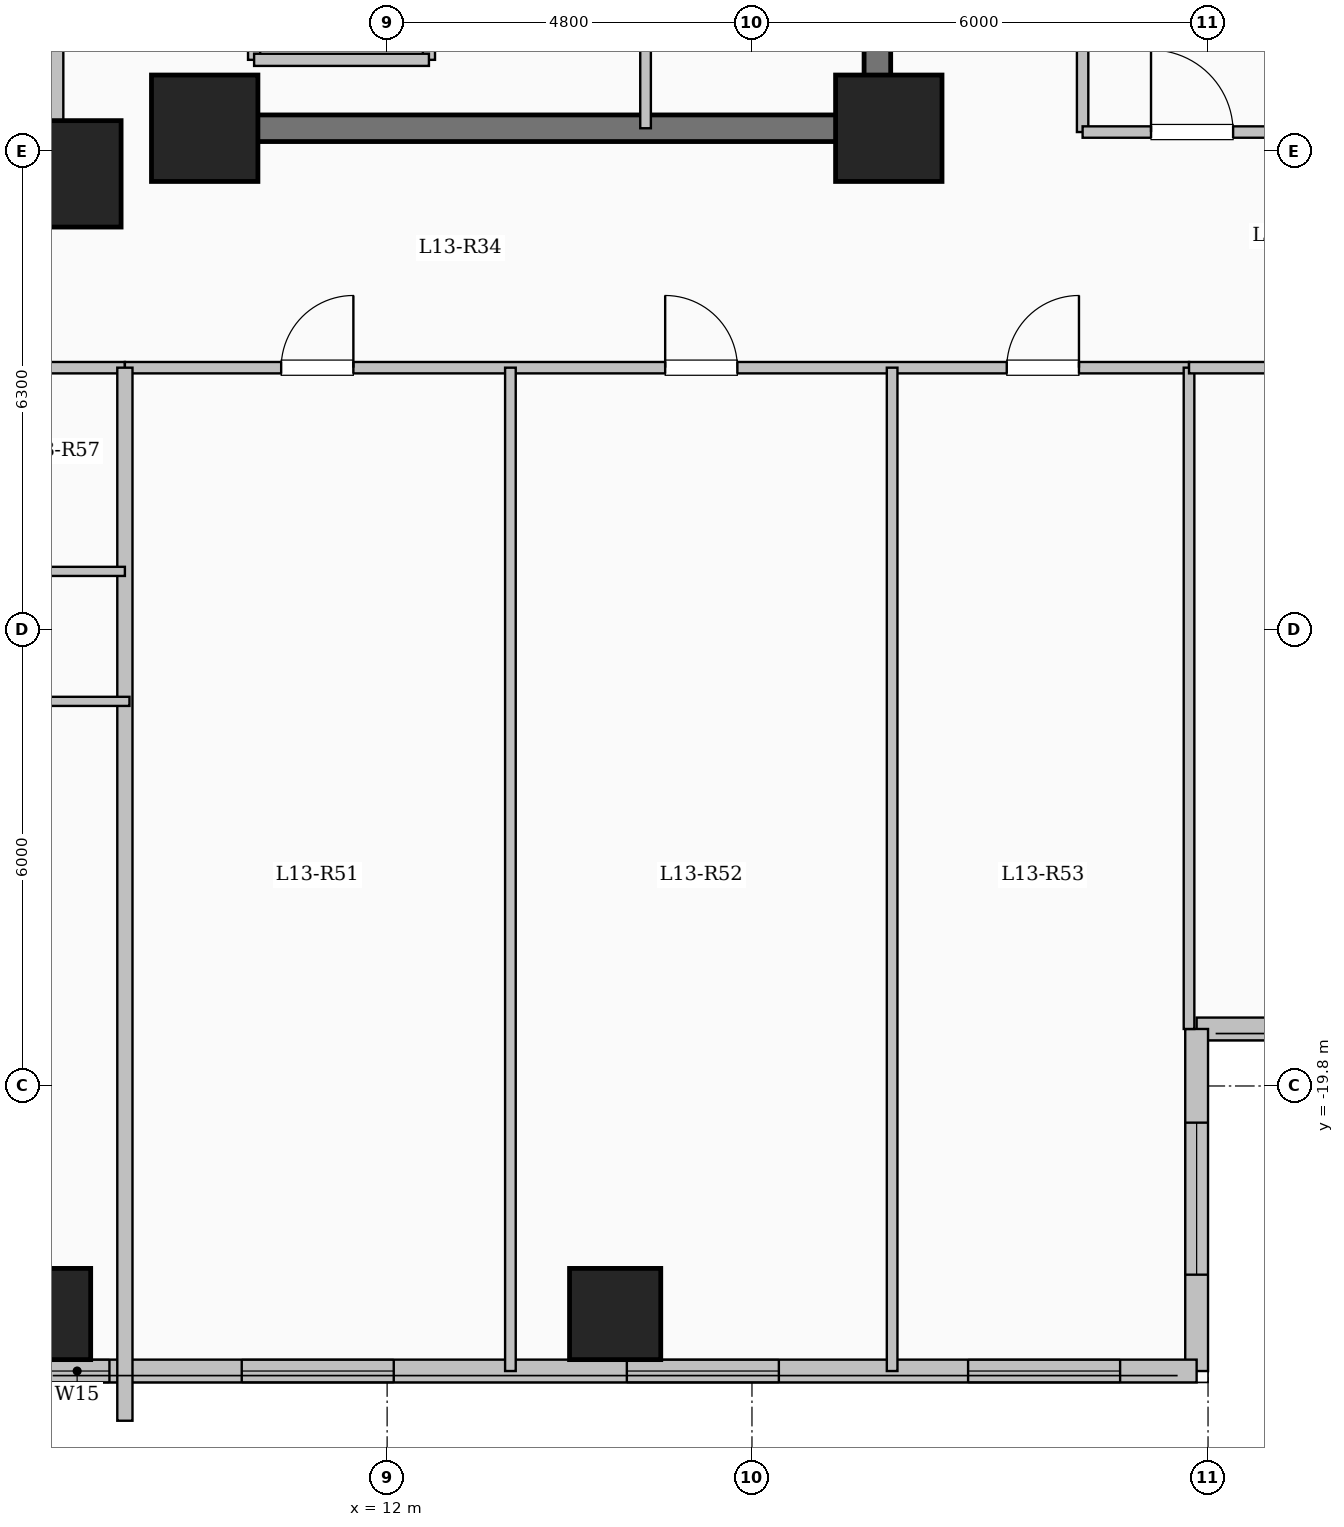
"""IFC4 building model, lengths in metres.
Left out: names, types, materials, properties, quantities, classifications, styles, units other than length and angle.
Written with IfcOpenShell. Run it as: python <this file> out.ifc"""

import sys

from ifc_helpers import new_model, si_unit, direction, frame, frame_2d, origin, origin_2d, place, context, subcontext, project, spatial, rectangle, extrude, element, fill, save


model = new_model("IFC4")
c1 = context("Model", 3, precision=1e-05, world=origin(), true_north=direction((0.0, 1.0)))
c2 = subcontext(c1, "Body", "Model", "MODEL_VIEW")
j1 = project(units=[si_unit("LENGTHUNIT", "METRE"), si_unit("PLANEANGLEUNIT", "RADIAN")], contexts=[c1])
p1 = place(None, origin())
s1 = spatial("IfcSite", under=j1, at=p1, CompositionType="ELEMENT")
p2 = place(p1, origin())
s2 = spatial("IfcBuilding", under=s1, at=p2, CompositionType="ELEMENT")
p3 = place(p2, frame((0.0, 0.0, 50.8)))
s3 = spatial("IfcBuildingStorey", under=s2, at=p3, CompositionType="ELEMENT", Elevation=50.8)
for number, where, z_axis, x_axis in (
    (1, (7.8, -7.8, 0.0), (0.0, 0.0, 1.0), (1.0, 0.0, 0.0)),
    (2, (9.6, -7.2, 0.0), (0.0, 0.0, 1.0), (1.0, 0.0, 0.0)),
    (3, (18.6, -7.2, 0.0), (0.0, 0.0, 1.0), (1.0, 0.0, 0.0)),
):
    element("IfcColumn", number, at=place(p3, frame(where, z_axis=z_axis, x_axis=x_axis)), inside=s3, PredefinedType="COLUMN", context=c2, shape_type="SweptSolid", body=[
        extrude(rectangle(XDim=1.4, YDim=1.4, at=origin_2d()), origin(), (0.0, 0.0, 1.0), 3.35),
    ])
for number, where, z_axis, x_axis in (
    (4, (7.5, -22.8, 0.0), (0.0, 0.0, 1.0), (1.0, 0.0, 0.0)),
    (5, (15.0, -22.8, 0.0), (0.0, 0.0, 1.0), (1.0, 0.0, 0.0)),
):
    element("IfcColumn", number, at=place(p3, frame(where, z_axis=z_axis, x_axis=x_axis)), inside=s3, PredefinedType="COLUMN", context=c2, shape_type="SweptSolid", body=[
        extrude(rectangle(XDim=1.2, YDim=1.2, at=origin_2d()), origin(), (0.0, 0.0, 1.0), 3.35),
    ])
p4 = place(p3, frame((-7.62, -7.62, 0.0), z_axis=(0.0, 0.0, 1.0), x_axis=(1.0, 0.0, 0.0)))
e6 = element("IfcWall", 6, at=p4, inside=s3, PredefinedType="SOLIDWALL", context=c2, shape_type="SweptSolid", body=[
    extrude(rectangle(XDim=15.24, YDim=0.24, at=frame_2d((7.62, 0.0))), origin(), (0.0, 0.0, 1.0), 3.1),
])
p5 = place(p4, frame((6.92, 0.0, 0.95)))
e7 = element("IfcOpeningElement", 7, at=p5, cuts=e6, PredefinedType="OPENING", context=c2, shape_type="SweptSolid", body=[
    extrude(rectangle(XDim=1.4, YDim=1.5, at=frame_2d((0.7, 0.75))), frame((0.0, 0.13, 0.0), z_axis=(0.0, -1.0, 0.0), x_axis=(1.0, 0.0, 0.0)), (0.0, 0.0, 1.0), 0.26),
])
p6 = place(p3, frame((7.62, -7.62, 0.0), z_axis=(0.0, 0.0, 1.0), x_axis=(0.0, 1.0, 0.0)))
e8 = element("IfcWall", 8, at=p6, inside=s3, PredefinedType="SOLIDWALL", context=c2, shape_type="SweptSolid", body=[
    extrude(rectangle(XDim=15.24, YDim=0.24, at=frame_2d((7.62, 0.0))), origin(), (0.0, 0.0, 1.0), 3.1),
])
p7 = place(p6, frame((6.92, 0.0, 0.95)))
e9 = element("IfcOpeningElement", 9, at=p7, cuts=e8, PredefinedType="OPENING", context=c2, shape_type="SweptSolid", body=[
    extrude(rectangle(XDim=1.4, YDim=1.5, at=frame_2d((0.7, 0.75))), frame((0.0, 0.13, 0.0), z_axis=(0.0, -1.0, 0.0), x_axis=(1.0, 0.0, 0.0)), (0.0, 0.0, 1.0), 0.26),
])
p8 = place(p3, frame((28.65, -19.05, 0.0), z_axis=(0.0, 0.0, 1.0), x_axis=(-1.0, 0.0, 0.0)))
e10 = element("IfcWall", 10, at=p8, inside=s3, PredefinedType="SOLIDWALL", context=c2, shape_type="SweptSolid", body=[
    extrude(rectangle(XDim=6.0, YDim=0.3, at=frame_2d((3.0, 0.0))), origin(), (0.0, 0.0, 1.0), 3.1),
])
p9 = place(p8, frame((1.825, 0.0, 0.9)))
e11 = element("IfcOpeningElement", 11, at=p9, cuts=e10, PredefinedType="OPENING", context=c2, shape_type="SweptSolid", body=[
    extrude(rectangle(XDim=2.4, YDim=1.8, at=frame_2d((1.2, 0.9))), frame((0.0, 0.16, 0.0), z_axis=(0.0, -1.0, 0.0), x_axis=(1.0, 0.0, 0.0)), (0.0, 0.0, 1.0), 0.32),
])
p10 = place(p3, frame((22.65, -19.05, 0.0), z_axis=(0.0, 0.0, 1.0), x_axis=(0.0, -1.0, 0.0)))
e12 = element("IfcWall", 12, at=p10, inside=s3, PredefinedType="SOLIDWALL", context=c2, shape_type="SweptSolid", body=[
    extrude(rectangle(XDim=4.5, YDim=0.3, at=frame_2d((2.25, 0.0))), origin(), (0.0, 0.0, 1.0), 3.1),
])
p11 = place(p10, frame((1.232, 0.0, 0.9)))
e13 = element("IfcOpeningElement", 13, at=p11, cuts=e12, PredefinedType="OPENING", context=c2, shape_type="SweptSolid", body=[
    extrude(rectangle(XDim=2.0, YDim=1.7, at=frame_2d((1.0, 0.85))), frame((0.0, 0.16, 0.0), z_axis=(0.0, -1.0, 0.0), x_axis=(1.0, 0.0, 0.0)), (0.0, 0.0, 1.0), 0.32),
])
p12 = place(p3, frame((22.65, -23.55, 0.0), z_axis=(0.0, 0.0, 1.0), x_axis=(-1.0, 0.0, 0.0)))
e14 = element("IfcWall", 14, at=p12, inside=s3, PredefinedType="SOLIDWALL", context=c2, shape_type="SweptSolid", body=[
    extrude(rectangle(XDim=15.3, YDim=0.3, at=frame_2d((7.65, 0.0))), origin(), (0.0, 0.0, 1.0), 3.1),
])
p13 = place(p12, frame((1.007, 0.0, 0.9)))
e15 = element("IfcOpeningElement", 15, at=p13, cuts=e14, PredefinedType="OPENING", context=c2, shape_type="SweptSolid", body=[
    extrude(rectangle(XDim=2.0, YDim=1.7, at=frame_2d((1.0, 0.85))), frame((0.0, 0.16, 0.0), z_axis=(0.0, -1.0, 0.0), x_axis=(1.0, 0.0, 0.0)), (0.0, 0.0, 1.0), 0.32),
])
p14 = place(p12, frame((5.496, 0.0, 0.9)))
e16 = element("IfcOpeningElement", 16, at=p14, cuts=e14, PredefinedType="OPENING", context=c2, shape_type="SweptSolid", body=[
    extrude(rectangle(XDim=2.0, YDim=1.7, at=frame_2d((1.0, 0.85))), frame((0.0, 0.16, 0.0), z_axis=(0.0, -1.0, 0.0), x_axis=(1.0, 0.0, 0.0)), (0.0, 0.0, 1.0), 0.32),
])
p15 = place(p12, frame((10.563, 0.0, 0.9)))
e17 = element("IfcOpeningElement", 17, at=p15, cuts=e14, PredefinedType="OPENING", context=c2, shape_type="SweptSolid", body=[
    extrude(rectangle(XDim=2.0, YDim=1.7, at=frame_2d((1.0, 0.85))), frame((0.0, 0.16, 0.0), z_axis=(0.0, -1.0, 0.0), x_axis=(1.0, 0.0, 0.0)), (0.0, 0.0, 1.0), 0.32),
])
p16 = place(p12, frame((14.303, 0.0, 0.95)))
e18 = element("IfcOpeningElement", 18, at=p16, cuts=e14, PredefinedType="OPENING", context=c2, shape_type="SweptSolid", body=[
    extrude(rectangle(XDim=0.85, YDim=1.5, at=frame_2d((0.425, 0.75))), frame((0.0, 0.16, 0.0), z_axis=(0.0, -1.0, 0.0), x_axis=(1.0, 0.0, 0.0)), (0.0, 0.0, 1.0), 0.32),
])
for number, where, z_axis, x_axis in (
    (19, (10.25, -6.3, 0.0), (0.0, 0.0, 1.0), (0.0, 1.0, 0.0)),
    (20, (12.55, -6.3, 0.0), (0.0, 0.0, 1.0), (0.0, 1.0, 0.0)),
):
    element("IfcWall", number, at=place(p3, frame(where, z_axis=z_axis, x_axis=x_axis)), inside=s3, PredefinedType="SOLIDWALL", context=c2, shape_type="SweptSolid", body=[
        extrude(rectangle(XDim=2.6, YDim=0.16, at=frame_2d((1.3, 0.0))), origin(), (0.0, 0.0, 1.0), 3.1),
    ])
p17 = place(p3, frame((10.25, -6.3, 0.0), z_axis=(0.0, 0.0, 1.0), x_axis=(1.0, 0.0, 0.0)))
e21 = element("IfcWall", 21, at=p17, inside=s3, PredefinedType="SOLIDWALL", context=c2, shape_type="SweptSolid", body=[
    extrude(rectangle(XDim=2.3, YDim=0.16, at=frame_2d((1.15, 0.0))), origin(), (0.0, 0.0, 1.0), 3.1),
])
p18 = place(p3, frame((18.45, -7.375, 0.0), z_axis=(0.0, 0.0, 1.0), x_axis=(0.0, 1.0, 0.0)))
e22 = element("IfcWall", 22, at=p18, inside=s3, PredefinedType="SHEAR", context=c2, shape_type="SweptSolid", body=[
    extrude(rectangle(XDim=14.05, YDim=0.35, at=frame_2d((7.025, 0.0))), origin(), (0.0, 0.0, 1.0), 3.35),
])
p19 = place(p3, frame((10.075, -7.2, 0.0), z_axis=(0.0, 0.0, 1.0), x_axis=(1.0, 0.0, 0.0)))
e23 = element("IfcWall", 23, at=p19, inside=s3, PredefinedType="SHEAR", context=c2, shape_type="SweptSolid", body=[
    extrude(rectangle(XDim=8.55, YDim=0.35, at=frame_2d((4.275, 0.0))), origin(), (0.0, 0.0, 1.0), 3.35),
])
p20 = place(p3, frame((15.4, -7.2, 0.0), z_axis=(0.0, 0.0, 1.0), x_axis=(0.0, 1.0, 0.0)))
e24 = element("IfcWall", 24, at=p20, inside=s3, PredefinedType="PARTITIONING", context=c2, shape_type="SweptSolid", body=[
    extrude(rectangle(XDim=10.45, YDim=0.14, at=frame_2d((5.225, 0.0))), origin(), (0.0, 0.0, 1.0), 3.1),
])
p21 = place(p20, frame((9.25, 0.0, 0.0)))
e25 = element("IfcOpeningElement", 25, at=p21, cuts=e24, PredefinedType="OPENING", context=c2, shape_type="SweptSolid", body=[
    extrude(rectangle(XDim=0.9, YDim=2.08, at=frame_2d((0.45, 1.04))), frame((0.0, 0.08, 0.0), z_axis=(0.0, -1.0, 0.0), x_axis=(1.0, 0.0, 0.0)), (0.0, 0.0, 1.0), 0.16),
])
p22 = place(p3, frame((21.15, -7.25, 0.0), z_axis=(0.0, 0.0, 1.0), x_axis=(0.0, 1.0, 0.0)))
e26 = element("IfcWall", 26, at=p22, inside=s3, PredefinedType="PARTITIONING", context=c2, shape_type="SweptSolid", body=[
    extrude(rectangle(XDim=18.0, YDim=0.15, at=frame_2d((9.0, 0.0))), origin(), (0.0, 0.0, 1.0), 2.585),
])
p23 = place(p3, frame((-8.55, -10.35, 0.0), z_axis=(0.0, 0.0, 1.0), x_axis=(1.0, 0.0, 0.0)))
e27 = element("IfcWall", 27, at=p23, inside=s3, PredefinedType="PARTITIONING", context=c2, shape_type="SweptSolid", body=[
    extrude(rectangle(XDim=17.1, YDim=0.15, at=frame_2d((8.55, 0.0))), origin(), (0.0, 0.0, 1.0), 3.1),
])
p24 = place(p23, frame((0.8, 0.0, 0.0)))
e28 = element("IfcOpeningElement", 28, at=p24, cuts=e27, PredefinedType="OPENING", context=c2, shape_type="SweptSolid", body=[
    extrude(rectangle(XDim=0.96, YDim=2.15, at=frame_2d((0.48, 1.075))), frame((0.0, 0.085, 0.0), z_axis=(0.0, -1.0, 0.0), x_axis=(1.0, 0.0, 0.0)), (0.0, 0.0, 1.0), 0.17),
])
p25 = place(p3, frame((8.55, -10.35, 0.0), z_axis=(0.0, 0.0, 1.0), x_axis=(1.0, 0.0, 0.0)))
e29 = element("IfcWall", 29, at=p25, inside=s3, PredefinedType="PARTITIONING", context=c2, shape_type="SweptSolid", body=[
    extrude(rectangle(XDim=14.0, YDim=0.15, at=frame_2d((7.0, 0.0))), origin(), (0.0, 0.0, 1.0), 3.1),
])
p26 = place(p25, frame((2.056, 0.0, 0.0)))
e30 = element("IfcOpeningElement", 30, at=p26, cuts=e29, PredefinedType="OPENING", context=c2, shape_type="SweptSolid", body=[
    extrude(rectangle(XDim=0.95, YDim=2.15, at=frame_2d((0.475, 1.075))), frame((0.0, 0.085, 0.0), z_axis=(0.0, -1.0, 0.0), x_axis=(1.0, 0.0, 0.0)), (0.0, 0.0, 1.0), 0.17),
])
p27 = place(p25, frame((7.108, 0.0, 0.0)))
e31 = element("IfcOpeningElement", 31, at=p27, cuts=e29, PredefinedType="OPENING", context=c2, shape_type="SweptSolid", body=[
    extrude(rectangle(XDim=0.95, YDim=2.15, at=frame_2d((0.475, 1.075))), frame((0.0, 0.085, 0.0), z_axis=(0.0, -1.0, 0.0), x_axis=(1.0, 0.0, 0.0)), (0.0, 0.0, 1.0), 0.17),
])
p28 = place(p25, frame((11.602, 0.0, 0.0)))
e32 = element("IfcOpeningElement", 32, at=p28, cuts=e29, PredefinedType="OPENING", context=c2, shape_type="SweptSolid", body=[
    extrude(rectangle(XDim=0.95, YDim=2.15, at=frame_2d((0.475, 1.075))), frame((0.0, 0.085, 0.0), z_axis=(0.0, -1.0, 0.0), x_axis=(1.0, 0.0, 0.0)), (0.0, 0.0, 1.0), 0.17),
])
for number, where, z_axis, x_axis in (
    (33, (13.622, -23.55, 0.0), (0.0, 0.0, 1.0), (0.0, 1.0, 0.0)),
    (34, (18.644, -23.55, 0.0), (0.0, 0.0, 1.0), (0.0, 1.0, 0.0)),
):
    element("IfcWall", number, at=place(p3, frame(where, z_axis=z_axis, x_axis=x_axis)), inside=s3, PredefinedType="PARTITIONING", context=c2, shape_type="SweptSolid", body=[
        extrude(rectangle(XDim=13.2, YDim=0.14, at=frame_2d((6.6, 0.0))), origin(), (0.0, 0.0, 1.0), 3.1),
    ])
p29 = place(p3, frame((8.55, -24.204, 0.0), z_axis=(0.0, 0.0, 1.0), x_axis=(0.0, 1.0, 0.0)))
e35 = element("IfcWall", 35, at=p29, inside=s3, PredefinedType="SOLIDWALL", context=c2, shape_type="SweptSolid", body=[
    extrude(rectangle(XDim=13.854, YDim=0.2, at=frame_2d((6.927, 0.0))), origin(), (0.0, 0.0, 1.0), 3.1),
])
p30 = place(p3, frame((3.872, -13.03, 0.0), z_axis=(0.0, 0.0, 1.0), x_axis=(1.0, 0.0, 0.0)))
e36 = element("IfcWall", 36, at=p30, inside=s3, PredefinedType="PARTITIONING", context=c2, shape_type="SweptSolid", body=[
    extrude(rectangle(XDim=4.678, YDim=0.12, at=frame_2d((2.339, 0.0))), origin(), (0.0, 0.0, 1.0), 2.585),
])
p31 = place(p30, frame((1.899, 0.0, 0.0)))
e37 = element("IfcOpeningElement", 37, at=p31, cuts=e36, PredefinedType="OPENING", context=c2, shape_type="SweptSolid", body=[
    extrude(rectangle(XDim=0.88, YDim=2.1, at=frame_2d((0.44, 1.05))), frame((0.0, 0.07, 0.0), z_axis=(0.0, -1.0, 0.0), x_axis=(1.0, 0.0, 0.0)), (0.0, 0.0, 1.0), 0.14),
])
p32 = place(p3, frame((-2.31, -14.74, 0.0), z_axis=(0.0, 0.0, 1.0), x_axis=(1.0, 0.0, 0.0)))
e38 = element("IfcWall", 38, at=p32, inside=s3, PredefinedType="PARTITIONING", context=c2, shape_type="SweptSolid", body=[
    extrude(rectangle(XDim=10.92, YDim=0.12, at=frame_2d((5.46, 0.0))), origin(), (0.0, 0.0, 1.0), 2.585),
])
p33 = place(p32, frame((1.35, 0.0, 0.0)))
e39 = element("IfcOpeningElement", 39, at=p33, cuts=e38, PredefinedType="OPENING", context=c2, shape_type="SweptSolid", body=[
    extrude(rectangle(XDim=0.88, YDim=2.1, at=frame_2d((0.44, 1.05))), frame((0.0, 0.07, 0.0), z_axis=(0.0, -1.0, 0.0), x_axis=(1.0, 0.0, 0.0)), (0.0, 0.0, 1.0), 0.14),
])
p34 = place(p32, frame((4.93, 0.0, 0.0)))
e40 = element("IfcOpeningElement", 40, at=p34, cuts=e38, PredefinedType="OPENING", context=c2, shape_type="SweptSolid", body=[
    extrude(rectangle(XDim=0.88, YDim=2.1, at=frame_2d((0.44, 1.05))), frame((0.0, 0.07, 0.0), z_axis=(0.0, -1.0, 0.0), x_axis=(1.0, 0.0, 0.0)), (0.0, 0.0, 1.0), 0.14),
])
p35 = place(p32, frame((8.51, 0.0, 0.0)))
e41 = element("IfcOpeningElement", 41, at=p35, cuts=e38, PredefinedType="OPENING", context=c2, shape_type="SweptSolid", body=[
    extrude(rectangle(XDim=0.88, YDim=2.1, at=frame_2d((0.44, 1.05))), frame((0.0, 0.07, 0.0), z_axis=(0.0, -1.0, 0.0), x_axis=(1.0, 0.0, 0.0)), (0.0, 0.0, 1.0), 0.14),
])
p36 = place(p3, frame((21.15, -7.25, 0.0), z_axis=(0.0, 0.0, 1.0), x_axis=(1.0, 0.0, 0.0)))
e42 = element("IfcWall", 42, at=p36, inside=s3, PredefinedType="PARTITIONING", context=c2, shape_type="SweptSolid", body=[
    extrude(rectangle(XDim=7.53, YDim=0.15, at=frame_2d((3.765, 0.0))), origin(), (0.0, 0.0, 1.0), 3.1),
])
p37 = place(p36, frame((0.9, 0.0, 0.0)))
e43 = element("IfcOpeningElement", 43, at=p37, cuts=e42, PredefinedType="OPENING", context=c2, shape_type="SweptSolid", body=[
    extrude(rectangle(XDim=1.08, YDim=2.15, at=frame_2d((0.54, 1.075))), frame((0.0, 0.085, 0.0), z_axis=(0.0, -1.0, 0.0), x_axis=(1.0, 0.0, 0.0)), (0.0, 0.0, 1.0), 0.17),
])
p38 = place(p3, frame((22.55, -19.05, 0.0), z_axis=(0.0, 0.0, 1.0), x_axis=(0.0, 1.0, 0.0)))
e44 = element("IfcWall", 44, at=p38, inside=s3, PredefinedType="PARTITIONING", context=c2, shape_type="SweptSolid", body=[
    extrude(rectangle(XDim=8.7, YDim=0.14, at=frame_2d((4.35, 0.0))), origin(), (0.0, 0.0, 1.0), 3.1),
])
p39 = place(p3, frame((22.55, -10.35, 0.0), z_axis=(0.0, 0.0, 1.0), x_axis=(1.0, 0.0, 0.0)))
e45 = element("IfcWall", 45, at=p39, inside=s3, PredefinedType="PARTITIONING", context=c2, shape_type="SweptSolid", body=[
    extrude(rectangle(XDim=6.13, YDim=0.15, at=frame_2d((3.065, 0.0))), origin(), (0.0, 0.0, 1.0), 3.1),
])
p40 = place(p39, frame((2.59, 0.0, 0.0)))
e46 = element("IfcOpeningElement", 46, at=p40, cuts=e45, PredefinedType="OPENING", context=c2, shape_type="SweptSolid", body=[
    extrude(rectangle(XDim=0.95, YDim=2.15, at=frame_2d((0.475, 1.075))), frame((0.0, 0.085, 0.0), z_axis=(0.0, -1.0, 0.0), x_axis=(1.0, 0.0, 0.0)), (0.0, 0.0, 1.0), 0.17),
])
p41 = place(p11, origin())
e47 = element("IfcWindow", 47, at=p41, inside=s3, PartitioningType="SINGLE_PANEL", PredefinedType="WINDOW", context=c2, shape_type="SweptSolid", body=[
    extrude(rectangle(XDim=2.0, YDim=1.7, at=frame_2d((1.0, 0.85))), frame((0.0, 0.03, 0.0), z_axis=(0.0, -1.0, 0.0), x_axis=(1.0, 0.0, 0.0)), (0.0, 0.0, 1.0), 0.06),
])
fill(e13, e47)
p42 = place(p13, origin())
e48 = element("IfcWindow", 48, at=p42, inside=s3, PartitioningType="SINGLE_PANEL", PredefinedType="WINDOW", context=c2, shape_type="SweptSolid", body=[
    extrude(rectangle(XDim=2.0, YDim=1.7, at=frame_2d((1.0, 0.85))), frame((0.0, 0.03, 0.0), z_axis=(0.0, -1.0, 0.0), x_axis=(1.0, 0.0, 0.0)), (0.0, 0.0, 1.0), 0.06),
])
fill(e15, e48)
p43 = place(p14, origin())
e49 = element("IfcWindow", 49, at=p43, inside=s3, PartitioningType="SINGLE_PANEL", PredefinedType="WINDOW", context=c2, shape_type="SweptSolid", body=[
    extrude(rectangle(XDim=2.0, YDim=1.7, at=frame_2d((1.0, 0.85))), frame((0.0, 0.03, 0.0), z_axis=(0.0, -1.0, 0.0), x_axis=(1.0, 0.0, 0.0)), (0.0, 0.0, 1.0), 0.06),
])
fill(e16, e49)
p44 = place(p15, origin())
e50 = element("IfcWindow", 50, at=p44, inside=s3, PartitioningType="SINGLE_PANEL", PredefinedType="WINDOW", context=c2, shape_type="SweptSolid", body=[
    extrude(rectangle(XDim=2.0, YDim=1.7, at=frame_2d((1.0, 0.85))), frame((0.0, 0.03, 0.0), z_axis=(0.0, -1.0, 0.0), x_axis=(1.0, 0.0, 0.0)), (0.0, 0.0, 1.0), 0.06),
])
fill(e17, e50)
p45 = place(p16, origin())
e51 = element("IfcWindow", 51, at=p45, inside=s3, PartitioningType="SINGLE_PANEL", PredefinedType="WINDOW", context=c2, shape_type="SweptSolid", body=[
    extrude(rectangle(XDim=0.85, YDim=1.5, at=frame_2d((0.425, 0.75))), frame((0.0, 0.03, 0.0), z_axis=(0.0, -1.0, 0.0), x_axis=(1.0, 0.0, 0.0)), (0.0, 0.0, 1.0), 0.06),
])
fill(e18, e51)
p46 = place(p26, origin())
e52 = element("IfcDoor", 52, at=p46, inside=s3, OperationType="SINGLE_SWING_RIGHT", PredefinedType="DOOR", context=c2, shape_type="SweptSolid", body=[
    extrude(rectangle(XDim=0.95, YDim=2.15, at=frame_2d((0.475, 1.075))), frame((0.0, 0.025, 0.0), z_axis=(0.0, -1.0, 0.0), x_axis=(1.0, 0.0, 0.0)), (0.0, 0.0, 1.0), 0.05),
])
fill(e30, e52)
p47 = place(p27, origin())
e53 = element("IfcDoor", 53, at=p47, inside=s3, OperationType="SINGLE_SWING_LEFT", PredefinedType="DOOR", context=c2, shape_type="SweptSolid", body=[
    extrude(rectangle(XDim=0.95, YDim=2.15, at=frame_2d((0.475, 1.075))), frame((0.0, 0.025, 0.0), z_axis=(0.0, -1.0, 0.0), x_axis=(1.0, 0.0, 0.0)), (0.0, 0.0, 1.0), 0.05),
])
fill(e31, e53)
p48 = place(p28, origin())
e54 = element("IfcDoor", 54, at=p48, inside=s3, OperationType="SINGLE_SWING_RIGHT", PredefinedType="DOOR", context=c2, shape_type="SweptSolid", body=[
    extrude(rectangle(XDim=0.95, YDim=2.15, at=frame_2d((0.475, 1.075))), frame((0.0, 0.025, 0.0), z_axis=(0.0, -1.0, 0.0), x_axis=(1.0, 0.0, 0.0)), (0.0, 0.0, 1.0), 0.05),
])
fill(e32, e54)
p49 = place(p37, origin())
e55 = element("IfcDoor", 55, at=p49, inside=s3, OperationType="SINGLE_SWING_LEFT", PredefinedType="DOOR", context=c2, shape_type="SweptSolid", body=[
    extrude(rectangle(XDim=1.08, YDim=2.15, at=frame_2d((0.54, 1.075))), frame((0.0, 0.025, 0.0), z_axis=(0.0, -1.0, 0.0), x_axis=(1.0, 0.0, 0.0)), (0.0, 0.0, 1.0), 0.05),
])
fill(e43, e55)
save(model, sys.argv[1])
